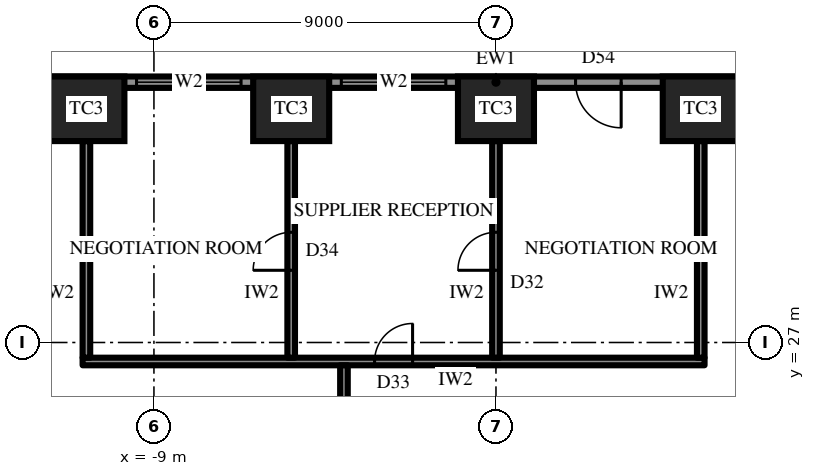
"""IFC4 building model, lengths in metres.
Left out: names, types, materials, properties, quantities, classifications, styles, units other than length and angle.
Written with IfcOpenShell. Run it as: python <this file> out.ifc"""

import sys

from ifc_helpers import new_model, si_unit, direction, frame, frame_2d, origin, origin_2d, place, context, subcontext, project, spatial, rectangle, extrude, element, fill, save


model = new_model("IFC4")
c1 = context("Model", 3, precision=1e-05, world=origin(), true_north=direction((0.0, 1.0)))
c2 = subcontext(c1, "Body", "Model", "MODEL_VIEW")
j1 = project(units=[si_unit("LENGTHUNIT", "METRE"), si_unit("PLANEANGLEUNIT", "RADIAN")], contexts=[c1])
p1 = place(None, origin())
s1 = spatial("IfcSite", under=j1, at=p1, CompositionType="ELEMENT")
p2 = place(p1, origin())
s2 = spatial("IfcBuilding", under=s1, at=p2, CompositionType="ELEMENT")
p3 = place(p2, frame((0.0, 0.0, 65.5)))
s3 = spatial("IfcBuildingStorey", under=s2, at=p3, CompositionType="ELEMENT", Elevation=65.5)
for number, where, z_axis, x_axis in (
    (1, (5.389, 33.15, 0.0), (0.0, 0.0, 1.0), (-1.0, 0.0, 0.0)),
    (2, (0.0, 33.15, 0.0), (0.0, 0.0, 1.0), (-1.0, 0.0, 0.0)),
    (3, (-5.389, 33.15, 0.0), (0.0, 0.0, 1.0), (-1.0, 0.0, 0.0)),
    (4, (-10.777, 33.15, 0.0), (0.0, 0.0, 1.0), (-1.0, 0.0, 0.0)),
):
    element("IfcColumn", number, at=place(p3, frame(where, z_axis=z_axis, x_axis=x_axis)), inside=s3, PredefinedType="COLUMN", context=c2, shape_type="SweptSolid", body=[
        extrude(rectangle(XDim=2.0, YDim=1.7, at=origin_2d()), origin(), (0.0, 0.0, 1.0), 4.2),
    ])
p4 = place(p3, frame((16.166, 33.85, 0.0), z_axis=(0.0, 0.0, 1.0), x_axis=(-1.0, 0.0, 0.0)))
e5 = element("IfcWall", 5, at=p4, inside=s3, PredefinedType="SOLIDWALL", context=c2, shape_type="SweptSolid", body=[
    extrude(rectangle(XDim=32.332, YDim=0.3, at=frame_2d((16.166, 0.0))), origin(), (0.0, 0.0, 1.0), 2.7),
])
p5 = place(p4, frame((1.319, 0.0, 0.6)))
e6 = element("IfcOpeningElement", 6, at=p5, cuts=e5, PredefinedType="OPENING", context=c2, shape_type="SweptSolid", body=[
    extrude(rectangle(XDim=2.75, YDim=1.85, at=frame_2d((1.375, 0.925))), frame((0.0, 0.16, 0.0), z_axis=(0.0, -1.0, 0.0), x_axis=(1.0, 0.0, 0.0)), (0.0, 0.0, 1.0), 0.32),
])
p6 = place(p4, frame((6.708, 0.0, 0.6)))
e7 = element("IfcOpeningElement", 7, at=p6, cuts=e5, PredefinedType="OPENING", context=c2, shape_type="SweptSolid", body=[
    extrude(rectangle(XDim=2.75, YDim=1.85, at=frame_2d((1.375, 0.925))), frame((0.0, 0.16, 0.0), z_axis=(0.0, -1.0, 0.0), x_axis=(1.0, 0.0, 0.0)), (0.0, 0.0, 1.0), 0.32),
])
p7 = place(p4, frame((12.872, 0.0, 0.0)))
e8 = element("IfcOpeningElement", 8, at=p7, cuts=e5, PredefinedType="OPENING", context=c2, shape_type="SweptSolid", body=[
    extrude(rectangle(XDim=1.2, YDim=2.4, at=frame_2d((0.6, 1.2))), frame((0.0, 0.16, 0.0), z_axis=(0.0, -1.0, 0.0), x_axis=(1.0, 0.0, 0.0)), (0.0, 0.0, 1.0), 0.32),
])
p8 = place(p4, frame((17.485, 0.0, 0.6)))
e9 = element("IfcOpeningElement", 9, at=p8, cuts=e5, PredefinedType="OPENING", context=c2, shape_type="SweptSolid", body=[
    extrude(rectangle(XDim=2.75, YDim=1.85, at=frame_2d((1.375, 0.925))), frame((0.0, 0.16, 0.0), z_axis=(0.0, -1.0, 0.0), x_axis=(1.0, 0.0, 0.0)), (0.0, 0.0, 1.0), 0.32),
])
p9 = place(p4, frame((22.874, 0.0, 0.6)))
e10 = element("IfcOpeningElement", 10, at=p9, cuts=e5, PredefinedType="OPENING", context=c2, shape_type="SweptSolid", body=[
    extrude(rectangle(XDim=2.75, YDim=1.85, at=frame_2d((1.375, 0.925))), frame((0.0, 0.16, 0.0), z_axis=(0.0, -1.0, 0.0), x_axis=(1.0, 0.0, 0.0)), (0.0, 0.0, 1.0), 0.32),
])
p10 = place(p4, frame((28.262, 0.0, 0.6)))
e11 = element("IfcOpeningElement", 11, at=p10, cuts=e5, PredefinedType="OPENING", context=c2, shape_type="SweptSolid", body=[
    extrude(rectangle(XDim=2.75, YDim=1.85, at=frame_2d((1.375, 0.925))), frame((0.0, 0.16, 0.0), z_axis=(0.0, -1.0, 0.0), x_axis=(1.0, 0.0, 0.0)), (0.0, 0.0, 1.0), 0.32),
])
p11 = place(p3, frame((5.489, 26.5, 0.0), z_axis=(0.0, 0.0, 1.0), x_axis=(-1.0, 0.0, 0.0)))
e12 = element("IfcWall", 12, at=p11, inside=s3, PredefinedType="PARTITIONING", context=c2, shape_type="SweptSolid", body=[
    extrude(rectangle(XDim=16.366, YDim=0.2, at=frame_2d((8.183, 0.0))), origin(), (0.0, 0.0, 1.0), 4.0),
])
p12 = place(p11, frame((7.683, 0.0, 0.0)))
e13 = element("IfcOpeningElement", 13, at=p12, cuts=e12, PredefinedType="OPENING", context=c2, shape_type="SweptSolid", body=[
    extrude(rectangle(XDim=1.0, YDim=2.2, at=frame_2d((0.5, 1.1))), frame((0.0, 0.11, 0.0), z_axis=(0.0, -1.0, 0.0), x_axis=(1.0, 0.0, 0.0)), (0.0, 0.0, 1.0), 0.22),
])
p13 = place(p3, frame((5.389, 26.6, 0.0), z_axis=(0.0, 0.0, 1.0), x_axis=(0.0, 1.0, 0.0)))
e14 = element("IfcWall", 14, at=p13, inside=s3, PredefinedType="PARTITIONING", context=c2, shape_type="SweptSolid", body=[
    extrude(rectangle(XDim=5.7, YDim=0.2, at=frame_2d((2.85, 0.0))), origin(), (0.0, 0.0, 1.0), 2.944),
])
p14 = place(p3, frame((0.0, 26.6, 0.0), z_axis=(0.0, 0.0, 1.0), x_axis=(0.0, 1.0, 0.0)))
e15 = element("IfcWall", 15, at=p14, inside=s3, PredefinedType="PARTITIONING", context=c2, shape_type="SweptSolid", body=[
    extrude(rectangle(XDim=5.7, YDim=0.2, at=frame_2d((2.85, 0.0))), origin(), (0.0, 0.0, 1.0), 2.944),
])
p15 = place(p14, frame((2.3, 0.0, 0.0)))
e16 = element("IfcOpeningElement", 16, at=p15, cuts=e15, PredefinedType="OPENING", context=c2, shape_type="SweptSolid", body=[
    extrude(rectangle(XDim=1.0, YDim=2.2, at=frame_2d((0.5, 1.1))), frame((0.0, 0.11, 0.0), z_axis=(0.0, -1.0, 0.0), x_axis=(1.0, 0.0, 0.0)), (0.0, 0.0, 1.0), 0.22),
])
p16 = place(p3, frame((-5.389, 26.6, 0.0), z_axis=(0.0, 0.0, 1.0), x_axis=(0.0, 1.0, 0.0)))
e17 = element("IfcWall", 17, at=p16, inside=s3, PredefinedType="PARTITIONING", context=c2, shape_type="SweptSolid", body=[
    extrude(rectangle(XDim=5.7, YDim=0.2, at=frame_2d((2.85, 0.0))), origin(), (0.0, 0.0, 1.0), 2.944),
])
p17 = place(p16, frame((2.3, 0.0, 0.0)))
e18 = element("IfcOpeningElement", 18, at=p17, cuts=e17, PredefinedType="OPENING", context=c2, shape_type="SweptSolid", body=[
    extrude(rectangle(XDim=1.0, YDim=2.2, at=frame_2d((0.5, 1.1))), frame((0.0, 0.11, 0.0), z_axis=(0.0, -1.0, 0.0), x_axis=(1.0, 0.0, 0.0)), (0.0, 0.0, 1.0), 0.22),
])
p18 = place(p3, frame((-10.777, 26.6, 0.0), z_axis=(0.0, 0.0, 1.0), x_axis=(0.0, 1.0, 0.0)))
e19 = element("IfcWall", 19, at=p18, inside=s3, PredefinedType="PARTITIONING", context=c2, shape_type="SweptSolid", body=[
    extrude(rectangle(XDim=5.7, YDim=0.2, at=frame_2d((2.85, 0.0))), origin(), (0.0, 0.0, 1.0), 2.944),
])
p19 = place(p3, frame((-4.0, 14.2, 0.0), z_axis=(0.0, 0.0, 1.0), x_axis=(0.0, 1.0, 0.0)))
e20 = element("IfcWall", 20, at=p19, inside=s3, PredefinedType="PARTITIONING", context=c2, shape_type="SweptSolid", body=[
    extrude(rectangle(XDim=12.2, YDim=0.2, at=frame_2d((6.1, 0.0))), origin(), (0.0, 0.0, 1.0), 4.0),
])
p20 = place(p19, frame((0.72, 0.0, 0.0)))
e21 = element("IfcOpeningElement", 21, at=p20, cuts=e20, PredefinedType="OPENING", context=c2, shape_type="SweptSolid", body=[
    extrude(rectangle(XDim=1.0, YDim=2.2, at=frame_2d((0.5, 1.1))), frame((0.0, 0.11, 0.0), z_axis=(0.0, -1.0, 0.0), x_axis=(1.0, 0.0, 0.0)), (0.0, 0.0, 1.0), 0.22),
])
p21 = place(p7, origin())
e22 = element("IfcDoor", 22, at=p21, inside=s3, OperationType="SINGLE_SWING_RIGHT", PredefinedType="DOOR", context=c2, shape_type="SweptSolid", body=[
    extrude(rectangle(XDim=1.2, YDim=2.4, at=frame_2d((0.6, 1.2))), frame((0.0, 0.025, 0.0), z_axis=(0.0, -1.0, 0.0), x_axis=(1.0, 0.0, 0.0)), (0.0, 0.0, 1.0), 0.05),
])
fill(e8, e22)
p22 = place(p8, origin())
e23 = element("IfcWindow", 23, at=p22, inside=s3, PartitioningType="SINGLE_PANEL", PredefinedType="WINDOW", context=c2, shape_type="SweptSolid", body=[
    extrude(rectangle(XDim=2.75, YDim=1.85, at=frame_2d((1.375, 0.925))), frame((0.0, 0.03, 0.0), z_axis=(0.0, -1.0, 0.0), x_axis=(1.0, 0.0, 0.0)), (0.0, 0.0, 1.0), 0.06),
])
fill(e9, e23)
p23 = place(p9, origin())
e24 = element("IfcWindow", 24, at=p23, inside=s3, PartitioningType="SINGLE_PANEL", PredefinedType="WINDOW", context=c2, shape_type="SweptSolid", body=[
    extrude(rectangle(XDim=2.75, YDim=1.85, at=frame_2d((1.375, 0.925))), frame((0.0, 0.03, 0.0), z_axis=(0.0, -1.0, 0.0), x_axis=(1.0, 0.0, 0.0)), (0.0, 0.0, 1.0), 0.06),
])
fill(e10, e24)
p24 = place(p15, origin())
e25 = element("IfcDoor", 25, at=p24, inside=s3, OperationType="SINGLE_SWING_RIGHT", PredefinedType="DOOR", context=c2, shape_type="SweptSolid", body=[
    extrude(rectangle(XDim=1.0, YDim=2.2, at=frame_2d((0.5, 1.1))), frame((0.0, 0.025, 0.0), z_axis=(0.0, -1.0, 0.0), x_axis=(1.0, 0.0, 0.0)), (0.0, 0.0, 1.0), 0.05),
])
fill(e16, e25)
p25 = place(p12, frame((1.0, 0.0, 0.0), z_axis=(0.0, 0.0, 1.0), x_axis=(-1.0, 0.0, 0.0)))
e26 = element("IfcDoor", 26, at=p25, inside=s3, OperationType="SINGLE_SWING_LEFT", PredefinedType="DOOR", context=c2, shape_type="SweptSolid", body=[
    extrude(rectangle(XDim=1.0, YDim=2.2, at=frame_2d((0.5, 1.1))), frame((0.0, 0.025, 0.0), z_axis=(0.0, -1.0, 0.0), x_axis=(1.0, 0.0, 0.0)), (0.0, 0.0, 1.0), 0.05),
])
fill(e13, e26)
p26 = place(p17, origin())
e27 = element("IfcDoor", 27, at=p26, inside=s3, OperationType="SINGLE_SWING_RIGHT", PredefinedType="DOOR", context=c2, shape_type="SweptSolid", body=[
    extrude(rectangle(XDim=1.0, YDim=2.2, at=frame_2d((0.5, 1.1))), frame((0.0, 0.025, 0.0), z_axis=(0.0, -1.0, 0.0), x_axis=(1.0, 0.0, 0.0)), (0.0, 0.0, 1.0), 0.05),
])
fill(e18, e27)
save(model, sys.argv[1])
